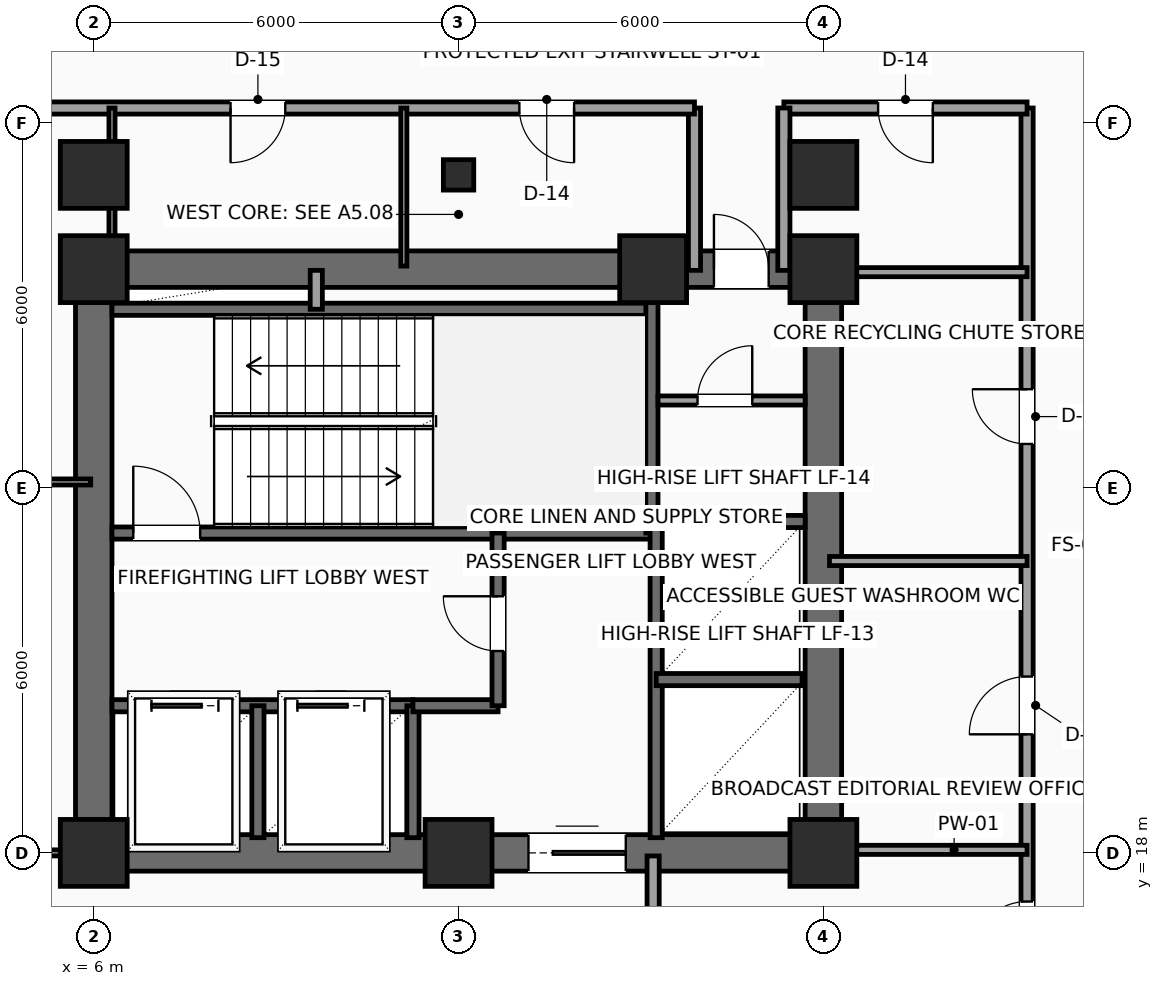
"""IFC4 building model, lengths in metres.
Left out: names, types, materials, properties, quantities, classifications, styles, units other than length and angle.
Written with IfcOpenShell. Run it as: python <this file> out.ifc"""

import sys

from ifc_helpers import new_model, si_unit, direction, frame, frame_2d, origin, origin_2d, place, context, subcontext, project, spatial, rectangle, hollow_rectangle, extrude, element, fill, save


model = new_model("IFC4")
c1 = context("Model", 3, precision=1e-05, world=origin(), true_north=direction((0.0, 1.0)))
c2 = subcontext(c1, "Body", "Model", "MODEL_VIEW")
j1 = project(units=[si_unit("LENGTHUNIT", "METRE"), si_unit("PLANEANGLEUNIT", "RADIAN")], contexts=[c1])
p1 = place(None, origin())
s1 = spatial("IfcSite", under=j1, at=p1, CompositionType="ELEMENT")
p2 = place(p1, origin())
s2 = spatial("IfcBuilding", under=s1, at=p2, CompositionType="ELEMENT")
p3 = place(p2, frame((0.0, 0.0, 141.9)))
s3 = spatial("IfcBuildingStorey", under=s2, at=p3, CompositionType="ELEMENT", Elevation=141.9)
for number, where, z_axis, x_axis in (
    (1, (6.0, 18.0, 0.0), (0.0, 0.0, 1.0), (1.0, 0.0, 0.0)),
    (2, (12.0, 18.0, 0.0), (0.0, 0.0, 1.0), (1.0, 0.0, 0.0)),
    (3, (18.0, 18.0, 0.0), (0.0, 0.0, 1.0), (1.0, 0.0, 0.0)),
    (4, (6.0, 27.6, 0.0), (0.0, 0.0, 1.0), (1.0, 0.0, 0.0)),
    (5, (15.2, 27.6, 0.0), (0.0, 0.0, 1.0), (1.0, 0.0, 0.0)),
    (6, (18.0, 27.6, 0.0), (0.0, 0.0, 1.0), (1.0, 0.0, 0.0)),
    (7, (6.0, 29.15, 0.0), (0.0, 0.0, 1.0), (1.0, 0.0, 0.0)),
):
    element("IfcColumn", number, at=place(p3, frame(where, z_axis=z_axis, x_axis=x_axis)), inside=s3, PredefinedType="COLUMN", context=c2, shape_type="SweptSolid", body=[
        extrude(rectangle(XDim=1.1, YDim=1.1, at=origin_2d()), origin(), (0.0, 0.0, 1.0), 3.75),
    ])
p4 = place(p3, frame((12.0, 29.15, 0.0), z_axis=(0.0, 0.0, 1.0), x_axis=(1.0, 0.0, 0.0)))
e8 = element("IfcColumn", 8, at=p4, inside=s3, PredefinedType="COLUMN", context=c2, shape_type="SweptSolid", body=[
    extrude(hollow_rectangle(XDim=0.5, YDim=0.5, WallThickness=0.025, InnerFilletRadius=0.025, OuterFilletRadius=0.04, at=origin_2d()), origin(), (0.0, 0.0, 1.0), 3.75),
])
p5 = place(p3, frame((18.0, 29.15, 0.0), z_axis=(0.0, 0.0, 1.0), x_axis=(1.0, 0.0, 0.0)))
e9 = element("IfcColumn", 9, at=p5, inside=s3, PredefinedType="COLUMN", context=c2, shape_type="SweptSolid", body=[
    extrude(rectangle(XDim=1.1, YDim=1.1, at=origin_2d()), origin(), (0.0, 0.0, 1.0), 3.75),
])
p6 = place(p3, frame((6.0, 18.0, 0.0), z_axis=(0.0, 0.0, 1.0), x_axis=(1.0, 0.0, 0.0)))
e10 = element("IfcWall", 10, at=p6, inside=s3, PredefinedType="SHEAR", context=c2, shape_type="SweptSolid", body=[
    extrude(rectangle(XDim=12.0, YDim=0.6, at=frame_2d((6.0, 0.0))), origin(), (0.0, 0.0, 1.0), 3.525),
])
p7 = place(p6, frame((7.15, 0.0, 0.0)))
e11 = element("IfcOpeningElement", 11, at=p7, cuts=e10, PredefinedType="OPENING", context=c2, shape_type="SweptSolid", body=[
    extrude(rectangle(XDim=1.6, YDim=2.3, at=frame_2d((0.8, 1.15))), frame((0.0, 0.31, 0.0), z_axis=(0.0, -1.0, 0.0), x_axis=(1.0, 0.0, 0.0)), (0.0, 0.0, 1.0), 0.62),
])
p8 = place(p3, frame((6.0, 27.6, 0.0), z_axis=(0.0, 0.0, 1.0), x_axis=(1.0, 0.0, 0.0)))
e12 = element("IfcWall", 12, at=p8, inside=s3, PredefinedType="SHEAR", context=c2, shape_type="SweptSolid", body=[
    extrude(rectangle(XDim=12.0, YDim=0.6, at=frame_2d((6.0, 0.0))), origin(), (0.0, 0.0, 1.0), 3.525),
])
p9 = place(p8, frame((10.2, 0.0, 0.0)))
e13 = element("IfcOpeningElement", 13, at=p9, cuts=e12, PredefinedType="OPENING", context=c2, shape_type="SweptSolid", body=[
    extrude(rectangle(XDim=0.9, YDim=2.15, at=frame_2d((0.45, 1.075))), frame((0.0, 0.31, 0.0), z_axis=(0.0, -1.0, 0.0), x_axis=(1.0, 0.0, 0.0)), (0.0, 0.0, 1.0), 0.62),
])
for number, where, z_axis, x_axis in (
    (14, (6.0, 18.0, 0.0), (0.0, 0.0, 1.0), (0.0, 1.0, 0.0)),
    (15, (18.0, 18.0, 0.0), (0.0, 0.0, 1.0), (0.0, 1.0, 0.0)),
):
    element("IfcWall", number, at=place(p3, frame(where, z_axis=z_axis, x_axis=x_axis)), inside=s3, PredefinedType="SHEAR", context=c2, shape_type="SweptSolid", body=[
        extrude(rectangle(XDim=9.6, YDim=0.6, at=frame_2d((4.8, 0.0))), origin(), (0.0, 0.0, 1.0), 3.525),
    ])
p10 = place(p3, frame((6.3, 23.26, 0.0), z_axis=(0.0, 0.0, 1.0), x_axis=(1.0, 0.0, 0.0)))
e16 = element("IfcWall", 16, at=p10, inside=s3, PredefinedType="SHEAR", context=c2, shape_type="SweptSolid", body=[
    extrude(rectangle(XDim=8.88, YDim=0.2, at=frame_2d((4.44, 0.0))), origin(), (0.0, 0.0, 1.0), 3.525),
])
p11 = place(p10, frame((0.35, 0.0, 0.0)))
e17 = element("IfcOpeningElement", 17, at=p11, cuts=e16, PredefinedType="OPENING", context=c2, shape_type="SweptSolid", body=[
    extrude(rectangle(XDim=1.1, YDim=2.2, at=frame_2d((0.55, 1.1))), frame((0.0, 0.11, 0.0), z_axis=(0.0, -1.0, 0.0), x_axis=(1.0, 0.0, 0.0)), (0.0, 0.0, 1.0), 0.22),
])
p12 = place(p3, frame((6.3, 26.94, 0.0), z_axis=(0.0, 0.0, 1.0), x_axis=(1.0, 0.0, 0.0)))
e18 = element("IfcWall", 18, at=p12, inside=s3, PredefinedType="SHEAR", context=c2, shape_type="SweptSolid", body=[
    extrude(rectangle(XDim=8.88, YDim=0.2, at=frame_2d((4.44, 0.0))), origin(), (0.0, 0.0, 1.0), 3.525),
])
p13 = place(p3, frame((15.18, 23.26, 0.0), z_axis=(0.0, 0.0, 1.0), x_axis=(0.0, 1.0, 0.0)))
e19 = element("IfcWall", 19, at=p13, inside=s3, PredefinedType="SHEAR", context=c2, shape_type="SweptSolid", body=[
    extrude(rectangle(XDim=4.04, YDim=0.2, at=frame_2d((2.02, 0.0))), origin(), (0.0, 0.0, 1.0), 3.525),
])
p14 = place(p3, frame((6.3, 20.42, 0.0), z_axis=(0.0, 0.0, 1.0), x_axis=(1.0, 0.0, 0.0)))
e20 = element("IfcWall", 20, at=p14, inside=s3, PredefinedType="SHEAR", context=c2, shape_type="SweptSolid", body=[
    extrude(rectangle(XDim=4.95, YDim=0.2, at=frame_2d((2.475, 0.0))), origin(), (0.0, 0.0, 1.0), 3.525),
])
p15 = place(p14, frame((0.65, 0.0, 0.0)))
e21 = element("IfcOpeningElement", 21, at=p15, cuts=e20, PredefinedType="OPENING", context=c2, shape_type="SweptSolid", body=[
    extrude(rectangle(XDim=1.1, YDim=2.2, at=frame_2d((0.55, 1.1))), frame((0.0, 0.11, 0.0), z_axis=(0.0, -1.0, 0.0), x_axis=(1.0, 0.0, 0.0)), (0.0, 0.0, 1.0), 0.22),
])
p16 = place(p14, frame((3.05, 0.0, 0.0)))
e22 = element("IfcOpeningElement", 22, at=p16, cuts=e20, PredefinedType="OPENING", context=c2, shape_type="SweptSolid", body=[
    extrude(rectangle(XDim=1.1, YDim=2.2, at=frame_2d((0.55, 1.1))), frame((0.0, 0.11, 0.0), z_axis=(0.0, -1.0, 0.0), x_axis=(1.0, 0.0, 0.0)), (0.0, 0.0, 1.0), 0.22),
])
for number, where, z_axis, x_axis in (
    (23, (8.7, 18.25, 0.0), (0.0, 0.0, 1.0), (0.0, 1.0, 0.0)),
    (24, (11.25, 18.25, 0.0), (0.0, 0.0, 1.0), (0.0, 1.0, 0.0)),
):
    element("IfcWall", number, at=place(p3, frame(where, z_axis=z_axis, x_axis=x_axis)), inside=s3, PredefinedType="SHEAR", context=c2, shape_type="SweptSolid", body=[
        extrude(rectangle(XDim=2.17, YDim=0.2, at=frame_2d((1.085, 0.0))), origin(), (0.0, 0.0, 1.0), 3.525),
    ])
p17 = place(p3, frame((11.25, 20.42, 0.0), z_axis=(0.0, 0.0, 1.0), x_axis=(1.0, 0.0, 0.0)))
e25 = element("IfcWall", 25, at=p17, inside=s3, PredefinedType="SHEAR", context=c2, shape_type="SweptSolid", body=[
    extrude(rectangle(XDim=1.4, YDim=0.2, at=frame_2d((0.7, 0.0))), origin(), (0.0, 0.0, 1.0), 3.525),
])
p18 = place(p3, frame((12.65, 20.42, 0.0), z_axis=(0.0, 0.0, 1.0), x_axis=(0.0, 1.0, 0.0)))
e26 = element("IfcWall", 26, at=p18, inside=s3, PredefinedType="SHEAR", context=c2, shape_type="SweptSolid", body=[
    extrude(rectangle(XDim=2.84, YDim=0.2, at=frame_2d((1.42, 0.0))), origin(), (0.0, 0.0, 1.0), 3.525),
])
p19 = place(p18, frame((0.9, 0.0, 0.0)))
e27 = element("IfcOpeningElement", 27, at=p19, cuts=e26, PredefinedType="OPENING", context=c2, shape_type="SweptSolid", body=[
    extrude(rectangle(XDim=0.9, YDim=2.15, at=frame_2d((0.45, 1.075))), frame((0.0, 0.11, 0.0), z_axis=(0.0, -1.0, 0.0), x_axis=(1.0, 0.0, 0.0)), (0.0, 0.0, 1.0), 0.22),
])
p20 = place(p3, frame((9.66, 26.94, 0.0), z_axis=(0.0, 0.0, 1.0), x_axis=(0.0, 1.0, 0.0)))
e28 = element("IfcWall", 28, at=p20, inside=s3, PredefinedType="SOLIDWALL", context=c2, shape_type="SweptSolid", body=[
    extrude(rectangle(XDim=0.64, YDim=0.2, at=frame_2d((0.32, 0.0))), origin(), (0.0, 0.0, 1.0), 3.525),
])
p21 = place(p3, frame((15.25, 18.25, 0.0), z_axis=(0.0, 0.0, 1.0), x_axis=(0.0, 1.0, 0.0)))
e29 = element("IfcWall", 29, at=p21, inside=s3, PredefinedType="SHEAR", context=c2, shape_type="SweptSolid", body=[
    extrude(rectangle(XDim=5.2, YDim=0.2, at=frame_2d((2.6, 0.0))), origin(), (0.0, 0.0, 1.0), 3.525),
])
p22 = place(p3, frame((15.25, 20.85, 0.0), z_axis=(0.0, 0.0, 1.0), x_axis=(1.0, 0.0, 0.0)))
e30 = element("IfcWall", 30, at=p22, inside=s3, PredefinedType="SHEAR", context=c2, shape_type="SweptSolid", body=[
    extrude(rectangle(XDim=2.4, YDim=0.2, at=frame_2d((1.2, 0.0))), origin(), (0.0, 0.0, 1.0), 3.525),
])
p23 = place(p3, frame((15.25, 23.45, 0.0), z_axis=(0.0, 0.0, 1.0), x_axis=(1.0, 0.0, 0.0)))
e31 = element("IfcWall", 31, at=p23, inside=s3, PredefinedType="SHEAR", context=c2, shape_type="SweptSolid", body=[
    extrude(rectangle(XDim=2.45, YDim=0.2, at=frame_2d((1.225, 0.0))), origin(), (0.0, 0.0, 1.0), 3.525),
])
p24 = place(p3, frame((15.28, 25.44, 0.0), z_axis=(0.0, 0.0, 1.0), x_axis=(1.0, 0.0, 0.0)))
e32 = element("IfcWall", 32, at=p24, inside=s3, PredefinedType="PARTITIONING", context=c2, shape_type="SweptSolid", body=[
    extrude(rectangle(XDim=2.42, YDim=0.15, at=frame_2d((1.21, 0.0))), origin(), (0.0, 0.0, 1.0), 3.525),
])
p25 = place(p24, frame((0.65, 0.0, 0.0)))
e33 = element("IfcOpeningElement", 33, at=p25, cuts=e32, PredefinedType="OPENING", context=c2, shape_type="SweptSolid", body=[
    extrude(rectangle(XDim=0.9, YDim=2.15, at=frame_2d((0.45, 1.075))), frame((0.0, 0.085, 0.0), z_axis=(0.0, -1.0, 0.0), x_axis=(1.0, 0.0, 0.0)), (0.0, 0.0, 1.0), 0.17),
])
p26 = place(p3, frame((15.2, 17.95, 0.0), z_axis=(0.0, 0.0, 1.0), x_axis=(0.0, -1.0, 0.0)))
e34 = element("IfcWall", 34, at=p26, inside=s3, PredefinedType="PARTITIONING", context=c2, shape_type="SweptSolid", body=[
    extrude(rectangle(XDim=2.4, YDim=0.2, at=frame_2d((1.2, 0.0))), origin(), (0.0, 0.0, 1.0), 3.525),
])
p27 = place(p3, frame((21.35, 11.25, 0.0), z_axis=(0.0, 0.0, 1.0), x_axis=(0.0, 1.0, 0.0)))
e35 = element("IfcWall", 35, at=p27, inside=s3, PredefinedType="PARTITIONING", context=c2, shape_type="SweptSolid", body=[
    extrude(rectangle(XDim=19.0, YDim=0.2, at=frame_2d((9.5, 0.0))), origin(), (0.0, 0.0, 1.0), 3.525),
])
p28 = place(p27, frame((8.7, 0.0, 0.0)))
e36 = element("IfcOpeningElement", 36, at=p28, cuts=e35, PredefinedType="OPENING", context=c2, shape_type="SweptSolid", body=[
    extrude(rectangle(XDim=0.95, YDim=2.15, at=frame_2d((0.475, 1.075))), frame((0.0, 0.11, 0.0), z_axis=(0.0, -1.0, 0.0), x_axis=(1.0, 0.0, 0.0)), (0.0, 0.0, 1.0), 0.22),
])
p29 = place(p27, frame((13.475, 0.0, 0.0)))
e37 = element("IfcOpeningElement", 37, at=p29, cuts=e35, PredefinedType="OPENING", context=c2, shape_type="SweptSolid", body=[
    extrude(rectangle(XDim=0.9, YDim=2.1, at=frame_2d((0.45, 1.05))), frame((0.0, 0.11, 0.0), z_axis=(0.0, -1.0, 0.0), x_axis=(1.0, 0.0, 0.0)), (0.0, 0.0, 1.0), 0.22),
])
p30 = place(p27, frame((5.05, 0.0, 0.0)))
e38 = element("IfcOpeningElement", 38, at=p30, cuts=e35, PredefinedType="OPENING", context=c2, shape_type="SweptSolid", body=[
    extrude(rectangle(XDim=0.9, YDim=2.1, at=frame_2d((0.45, 1.05))), frame((0.0, 0.11, 0.0), z_axis=(0.0, -1.0, 0.0), x_axis=(1.0, 0.0, 0.0)), (0.0, 0.0, 1.0), 0.22),
])
p31 = place(p3, frame((21.35, 30.25, 0.0), z_axis=(0.0, 0.0, 1.0), x_axis=(-1.0, 0.0, 0.0)))
e39 = element("IfcWall", 39, at=p31, inside=s3, PredefinedType="PARTITIONING", context=c2, shape_type="SweptSolid", body=[
    extrude(rectangle(XDim=4.0, YDim=0.2, at=frame_2d((2.0, 0.0))), origin(), (0.0, 0.0, 1.0), 3.525),
])
p32 = place(p31, frame((1.55, 0.0, 0.0)))
e40 = element("IfcOpeningElement", 40, at=p32, cuts=e39, PredefinedType="OPENING", context=c2, shape_type="SweptSolid", body=[
    extrude(rectangle(XDim=0.9, YDim=2.1, at=frame_2d((0.45, 1.05))), frame((0.0, 0.11, 0.0), z_axis=(0.0, -1.0, 0.0), x_axis=(1.0, 0.0, 0.0)), (0.0, 0.0, 1.0), 0.22),
])
for number, where, z_axis, x_axis in (
    (41, (17.35, 30.25, 0.0), (0.0, 0.0, 1.0), (0.0, -1.0, 0.0)),
    (42, (15.88, 27.58, 0.0), (0.0, 0.0, 1.0), (0.0, 1.0, 0.0)),
):
    element("IfcWall", number, at=place(p3, frame(where, z_axis=z_axis, x_axis=x_axis)), inside=s3, PredefinedType="PARTITIONING", context=c2, shape_type="SweptSolid", body=[
        extrude(rectangle(XDim=2.67, YDim=0.2, at=frame_2d((1.335, 0.0))), origin(), (0.0, 0.0, 1.0), 3.525),
    ])
p33 = place(p3, frame((15.88, 30.25, 0.0), z_axis=(0.0, 0.0, 1.0), x_axis=(-1.0, 0.0, 0.0)))
e43 = element("IfcWall", 43, at=p33, inside=s3, PredefinedType="PARTITIONING", context=c2, shape_type="SweptSolid", body=[
    extrude(rectangle(XDim=15.58, YDim=0.2, at=frame_2d((7.79, 0.0))), origin(), (0.0, 0.0, 1.0), 3.525),
])
p34 = place(p33, frame((12.28, 0.0, 0.0)))
e44 = element("IfcOpeningElement", 44, at=p34, cuts=e43, PredefinedType="OPENING", context=c2, shape_type="SweptSolid", body=[
    extrude(rectangle(XDim=0.9, YDim=2.1, at=frame_2d((0.45, 1.05))), frame((0.0, 0.11, 0.0), z_axis=(0.0, -1.0, 0.0), x_axis=(1.0, 0.0, 0.0)), (0.0, 0.0, 1.0), 0.22),
])
p35 = place(p33, frame((6.73, 0.0, 0.0)))
e45 = element("IfcOpeningElement", 45, at=p35, cuts=e43, PredefinedType="OPENING", context=c2, shape_type="SweptSolid", body=[
    extrude(rectangle(XDim=0.9, YDim=2.1, at=frame_2d((0.45, 1.05))), frame((0.0, 0.11, 0.0), z_axis=(0.0, -1.0, 0.0), x_axis=(1.0, 0.0, 0.0)), (0.0, 0.0, 1.0), 0.22),
])
p36 = place(p33, frame((1.98, 0.0, 0.0)))
e46 = element("IfcOpeningElement", 46, at=p36, cuts=e43, PredefinedType="OPENING", context=c2, shape_type="SweptSolid", body=[
    extrude(rectangle(XDim=0.9, YDim=2.1, at=frame_2d((0.45, 1.05))), frame((0.0, 0.11, 0.0), z_axis=(0.0, -1.0, 0.0), x_axis=(1.0, 0.0, 0.0)), (0.0, 0.0, 1.0), 0.22),
])
p37 = place(p3, frame((18.1, 18.05, 0.0), z_axis=(0.0, 0.0, 1.0), x_axis=(1.0, 0.0, 0.0)))
e47 = element("IfcWall", 47, at=p37, inside=s3, PredefinedType="PARTITIONING", context=c2, shape_type="SweptSolid", body=[
    extrude(rectangle(XDim=3.25, YDim=0.15, at=frame_2d((1.625, 0.0))), origin(), (0.0, 0.0, 1.0), 3.017),
])
for number, where, z_axis, x_axis in (
    (48, (18.1, 22.8, 0.0), (0.0, 0.0, 1.0), (1.0, 0.0, 0.0)),
    (49, (18.1, 27.55, 0.0), (0.0, 0.0, 1.0), (1.0, 0.0, 0.0)),
):
    element("IfcWall", number, at=place(p3, frame(where, z_axis=z_axis, x_axis=x_axis)), inside=s3, PredefinedType="PARTITIONING", context=c2, shape_type="SweptSolid", body=[
        extrude(rectangle(XDim=3.25, YDim=0.15, at=frame_2d((1.625, 0.0))), origin(), (0.0, 0.0, 1.0), 3.525),
    ])
p38 = place(p3, frame((0.3, 18.0, 0.0), z_axis=(0.0, 0.0, 1.0), x_axis=(1.0, 0.0, 0.0)))
e50 = element("IfcWall", 50, at=p38, inside=s3, PredefinedType="PARTITIONING", context=c2, shape_type="SweptSolid", body=[
    extrude(rectangle(XDim=5.65, YDim=0.1, at=frame_2d((2.825, 0.0))), origin(), (0.0, 0.0, 1.0), 3.017),
])
p39 = place(p38, frame((2.4, 0.0, 0.0)))
e51 = element("IfcOpeningElement", 51, at=p39, cuts=e50, PredefinedType="OPENING", context=c2, shape_type="SweptSolid", body=[
    extrude(rectangle(XDim=0.9, YDim=2.1, at=frame_2d((0.45, 1.05))), frame((0.0, 0.06, 0.0), z_axis=(0.0, -1.0, 0.0), x_axis=(1.0, 0.0, 0.0)), (0.0, 0.0, 1.0), 0.12),
])
p40 = place(p3, frame((0.3, 24.1, 0.0), z_axis=(0.0, 0.0, 1.0), x_axis=(1.0, 0.0, 0.0)))
e52 = element("IfcWall", 52, at=p40, inside=s3, PredefinedType="PARTITIONING", context=c2, shape_type="SweptSolid", body=[
    extrude(rectangle(XDim=5.65, YDim=0.1, at=frame_2d((2.825, 0.0))), origin(), (0.0, 0.0, 1.0), 3.525),
])
for number, where, z_axis, x_axis in (
    (53, (6.3, 27.65, 0.0), (0.0, 0.0, 1.0), (0.0, 1.0, 0.0)),
    (54, (11.1, 27.65, 0.0), (0.0, 0.0, 1.0), (0.0, 1.0, 0.0)),
):
    element("IfcWall", number, at=place(p3, frame(where, z_axis=z_axis, x_axis=x_axis)), inside=s3, PredefinedType="PARTITIONING", context=c2, shape_type="SweptSolid", body=[
        extrude(rectangle(XDim=2.6, YDim=0.1, at=frame_2d((1.3, 0.0))), origin(), (0.0, 0.0, 1.0), 3.525),
    ])
p41 = place(p7, origin())
e55 = element("IfcDoor", 55, at=p41, inside=s3, OperationType="DOUBLE_DOOR_SLIDING", PredefinedType="DOOR", context=c2, shape_type="SweptSolid", body=[
    extrude(rectangle(XDim=1.6, YDim=2.3, at=frame_2d((0.8, 1.15))), frame((0.0, 0.025, 0.0), z_axis=(0.0, -1.0, 0.0), x_axis=(1.0, 0.0, 0.0)), (0.0, 0.0, 1.0), 0.05),
])
fill(e11, e55)
p42 = place(p9, origin())
e56 = element("IfcDoor", 56, at=p42, inside=s3, OperationType="SINGLE_SWING_LEFT", PredefinedType="DOOR", context=c2, shape_type="SweptSolid", body=[
    extrude(rectangle(XDim=0.9, YDim=2.15, at=frame_2d((0.45, 1.075))), frame((0.0, 0.025, 0.0), z_axis=(0.0, -1.0, 0.0), x_axis=(1.0, 0.0, 0.0)), (0.0, 0.0, 1.0), 0.05),
])
fill(e13, e56)
p43 = place(p11, origin())
e57 = element("IfcDoor", 57, at=p43, inside=s3, OperationType="SINGLE_SWING_LEFT", PredefinedType="DOOR", context=c2, shape_type="SweptSolid", body=[
    extrude(rectangle(XDim=1.1, YDim=2.2, at=frame_2d((0.55, 1.1))), frame((0.0, 0.025, 0.0), z_axis=(0.0, -1.0, 0.0), x_axis=(1.0, 0.0, 0.0)), (0.0, 0.0, 1.0), 0.05),
])
fill(e17, e57)
p44 = place(p15, origin())
e58 = element("IfcDoor", 58, at=p44, inside=s3, OperationType="SLIDING_TO_LEFT", PredefinedType="DOOR", context=c2, shape_type="SweptSolid", body=[
    extrude(rectangle(XDim=1.1, YDim=2.2, at=frame_2d((0.55, 1.1))), frame((0.0, 0.025, 0.0), z_axis=(0.0, -1.0, 0.0), x_axis=(1.0, 0.0, 0.0)), (0.0, 0.0, 1.0), 0.05),
])
fill(e21, e58)
p45 = place(p16, origin())
e59 = element("IfcDoor", 59, at=p45, inside=s3, OperationType="SLIDING_TO_LEFT", PredefinedType="DOOR", context=c2, shape_type="SweptSolid", body=[
    extrude(rectangle(XDim=1.1, YDim=2.2, at=frame_2d((0.55, 1.1))), frame((0.0, 0.025, 0.0), z_axis=(0.0, -1.0, 0.0), x_axis=(1.0, 0.0, 0.0)), (0.0, 0.0, 1.0), 0.05),
])
fill(e22, e59)
p46 = place(p19, origin())
e60 = element("IfcDoor", 60, at=p46, inside=s3, OperationType="SINGLE_SWING_RIGHT", PredefinedType="DOOR", context=c2, shape_type="SweptSolid", body=[
    extrude(rectangle(XDim=0.9, YDim=2.15, at=frame_2d((0.45, 1.075))), frame((0.0, 0.025, 0.0), z_axis=(0.0, -1.0, 0.0), x_axis=(1.0, 0.0, 0.0)), (0.0, 0.0, 1.0), 0.05),
])
fill(e27, e60)
p47 = place(p25, origin())
e61 = element("IfcDoor", 61, at=p47, inside=s3, OperationType="SINGLE_SWING_RIGHT", PredefinedType="DOOR", context=c2, shape_type="SweptSolid", body=[
    extrude(rectangle(XDim=0.9, YDim=2.15, at=frame_2d((0.45, 1.075))), frame((0.0, 0.025, 0.0), z_axis=(0.0, -1.0, 0.0), x_axis=(1.0, 0.0, 0.0)), (0.0, 0.0, 1.0), 0.05),
])
fill(e33, e61)
p48 = place(p28, origin())
e62 = element("IfcDoor", 62, at=p48, inside=s3, OperationType="SINGLE_SWING_LEFT", PredefinedType="DOOR", context=c2, shape_type="SweptSolid", body=[
    extrude(rectangle(XDim=0.95, YDim=2.15, at=frame_2d((0.475, 1.075))), frame((0.0, 0.025, 0.0), z_axis=(0.0, -1.0, 0.0), x_axis=(1.0, 0.0, 0.0)), (0.0, 0.0, 1.0), 0.05),
])
fill(e36, e62)
p49 = place(p29, origin())
e63 = element("IfcDoor", 63, at=p49, inside=s3, OperationType="SINGLE_SWING_RIGHT", PredefinedType="DOOR", context=c2, shape_type="SweptSolid", body=[
    extrude(rectangle(XDim=0.9, YDim=2.1, at=frame_2d((0.45, 1.05))), frame((0.0, 0.025, 0.0), z_axis=(0.0, -1.0, 0.0), x_axis=(1.0, 0.0, 0.0)), (0.0, 0.0, 1.0), 0.05),
])
fill(e37, e63)
p50 = place(p30, origin())
e64 = element("IfcDoor", 64, at=p50, inside=s3, OperationType="SINGLE_SWING_LEFT", PredefinedType="DOOR", context=c2, shape_type="SweptSolid", body=[
    extrude(rectangle(XDim=0.9, YDim=2.1, at=frame_2d((0.45, 1.05))), frame((0.0, 0.025, 0.0), z_axis=(0.0, -1.0, 0.0), x_axis=(1.0, 0.0, 0.0)), (0.0, 0.0, 1.0), 0.05),
])
fill(e38, e64)
p51 = place(p32, origin())
e65 = element("IfcDoor", 65, at=p51, inside=s3, OperationType="SINGLE_SWING_LEFT", PredefinedType="DOOR", context=c2, shape_type="SweptSolid", body=[
    extrude(rectangle(XDim=0.9, YDim=2.1, at=frame_2d((0.45, 1.05))), frame((0.0, 0.025, 0.0), z_axis=(0.0, -1.0, 0.0), x_axis=(1.0, 0.0, 0.0)), (0.0, 0.0, 1.0), 0.05),
])
fill(e40, e65)
p52 = place(p35, origin())
e66 = element("IfcDoor", 66, at=p52, inside=s3, OperationType="SINGLE_SWING_RIGHT", PredefinedType="DOOR", context=c2, shape_type="SweptSolid", body=[
    extrude(rectangle(XDim=0.9, YDim=2.1, at=frame_2d((0.45, 1.05))), frame((0.0, 0.025, 0.0), z_axis=(0.0, -1.0, 0.0), x_axis=(1.0, 0.0, 0.0)), (0.0, 0.0, 1.0), 0.05),
])
fill(e45, e66)
p53 = place(p36, origin())
e67 = element("IfcDoor", 67, at=p53, inside=s3, OperationType="SINGLE_SWING_LEFT", PredefinedType="DOOR", context=c2, shape_type="SweptSolid", body=[
    extrude(rectangle(XDim=0.9, YDim=2.1, at=frame_2d((0.45, 1.05))), frame((0.0, 0.025, 0.0), z_axis=(0.0, -1.0, 0.0), x_axis=(1.0, 0.0, 0.0)), (0.0, 0.0, 1.0), 0.05),
])
fill(e46, e67)
save(model, sys.argv[1])
